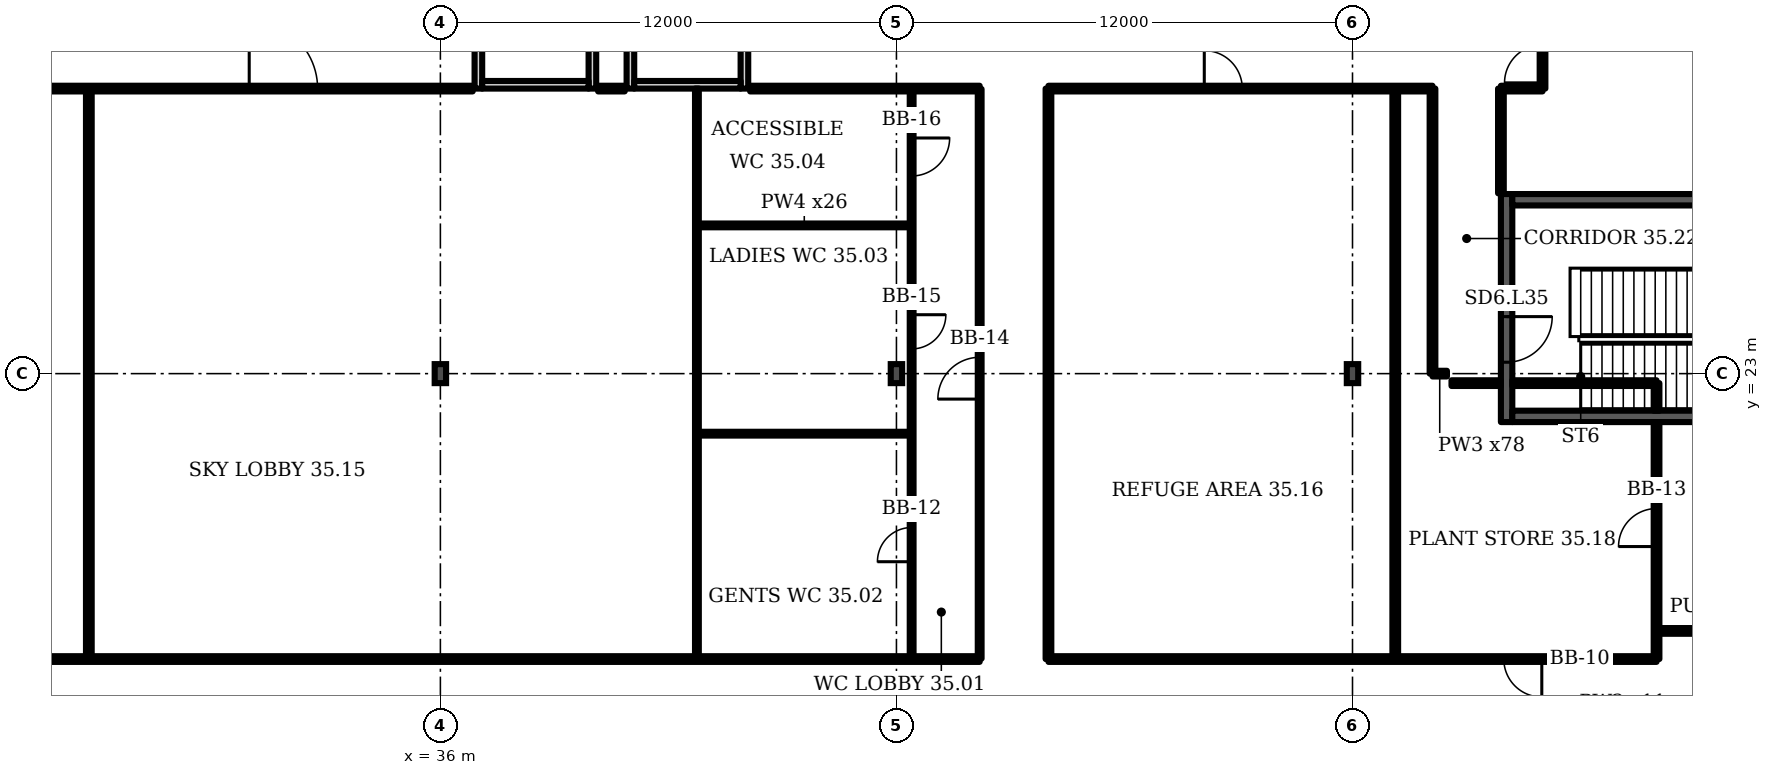
"""IFC4 building model, lengths in metres.
Left out: names, types, materials, properties, quantities, classifications, styles, units other than length and angle.
Written with IfcOpenShell. Run it as: python <this file> out.ifc"""

import sys

from ifc_helpers import new_model, si_unit, direction, frame, frame_2d, origin, origin_2d, place, context, subcontext, project, spatial, rectangle, i_section, extrude, element, fill, save


model = new_model("IFC4")
c1 = context("Model", 3, precision=1e-05, world=origin(), true_north=direction((0.0, 1.0)))
c2 = subcontext(c1, "Body", "Model", "MODEL_VIEW")
j1 = project(units=[si_unit("LENGTHUNIT", "METRE"), si_unit("PLANEANGLEUNIT", "RADIAN")], contexts=[c1])
p1 = place(None, origin())
s1 = spatial("IfcSite", under=j1, at=p1, CompositionType="ELEMENT")
p2 = place(p1, origin())
s2 = spatial("IfcBuilding", under=s1, at=p2, CompositionType="ELEMENT")
p3 = place(p2, frame((0.0, 0.0, 147.1)))
s3 = spatial("IfcBuildingStorey", under=s2, at=p3, CompositionType="ELEMENT", Elevation=147.1)
for number, where, z_axis, x_axis in (
    (1, (36.0, 23.0, 0.0), (0.0, 0.0, 1.0), (1.0, 0.0, 0.0)),
    (2, (48.0, 23.0, 0.0), (0.0, 0.0, 1.0), (1.0, 0.0, 0.0)),
    (3, (60.0, 23.0, 0.0), (0.0, 0.0, 1.0), (1.0, 0.0, 0.0)),
):
    element("IfcColumn", number, at=place(p3, frame(where, z_axis=z_axis, x_axis=x_axis)), inside=s3, PredefinedType="COLUMN", context=c2, shape_type="SweptSolid", body=[
        extrude(i_section(OverallWidth=0.3, OverallDepth=0.5, WebThickness=0.014, FlangeThickness=0.028, FilletRadius=0.027, at=origin_2d()), origin(), (0.0, 0.0, 1.0), 4.8),
    ])
p4 = place(p3, frame((37.0, 30.5, 0.0), z_axis=(0.0, 0.0, 1.0), x_axis=(0.0, 1.0, 0.0)))
e4 = element("IfcWall", 4, at=p4, inside=s3, PredefinedType="PARTITIONING", context=c2, shape_type="SweptSolid", body=[
    extrude(rectangle(XDim=3.5, YDim=0.2, at=frame_2d((1.75, 0.0))), origin(), (0.0, 0.0, 1.0), 4.4),
])
p5 = place(p4, frame((1.2, 0.0, 0.0)))
e5 = element("IfcOpeningElement", 5, at=p5, cuts=e4, PredefinedType="OPENING", context=c2, shape_type="SweptSolid", body=[
    extrude(rectangle(XDim=1.1, YDim=2.1, at=frame_2d((0.55, 1.05))), frame((0.0, 0.11, 0.0), z_axis=(0.0, -1.0, 0.0), x_axis=(1.0, 0.0, 0.0)), (0.0, 0.0, 1.0), 0.22),
])
p6 = place(p3, frame((40.0, 30.5, 0.0), z_axis=(0.0, 0.0, 1.0), x_axis=(0.0, 1.0, 0.0)))
e6 = element("IfcWall", 6, at=p6, inside=s3, PredefinedType="PARTITIONING", context=c2, shape_type="SweptSolid", body=[
    extrude(rectangle(XDim=3.5, YDim=0.2, at=frame_2d((1.75, 0.0))), origin(), (0.0, 0.0, 1.0), 4.4),
])
p7 = place(p3, frame((37.1, 30.6, 0.0), z_axis=(0.0, 0.0, 1.0), x_axis=(1.0, 0.0, 0.0)))
e7 = element("IfcWall", 7, at=p7, inside=s3, PredefinedType="PARTITIONING", context=c2, shape_type="SweptSolid", body=[
    extrude(rectangle(XDim=2.8, YDim=0.2, at=frame_2d((1.4, 0.0))), origin(), (0.0, 0.0, 1.0), 4.4),
])
p8 = place(p3, frame((41.0, 30.5, 0.0), z_axis=(0.0, 0.0, 1.0), x_axis=(0.0, 1.0, 0.0)))
e8 = element("IfcWall", 8, at=p8, inside=s3, PredefinedType="PARTITIONING", context=c2, shape_type="SweptSolid", body=[
    extrude(rectangle(XDim=3.5, YDim=0.2, at=frame_2d((1.75, 0.0))), origin(), (0.0, 0.0, 1.0), 4.4),
])
p9 = place(p3, frame((44.0, 30.5, 0.0), z_axis=(0.0, 0.0, 1.0), x_axis=(0.0, 1.0, 0.0)))
e9 = element("IfcWall", 9, at=p9, inside=s3, PredefinedType="PARTITIONING", context=c2, shape_type="SweptSolid", body=[
    extrude(rectangle(XDim=3.5, YDim=0.2, at=frame_2d((1.75, 0.0))), origin(), (0.0, 0.0, 1.0), 4.4),
])
p10 = place(p9, frame((1.2, 0.0, 0.0)))
e10 = element("IfcOpeningElement", 10, at=p10, cuts=e9, PredefinedType="OPENING", context=c2, shape_type="SweptSolid", body=[
    extrude(rectangle(XDim=1.1, YDim=2.1, at=frame_2d((0.55, 1.05))), frame((0.0, 0.11, 0.0), z_axis=(0.0, -1.0, 0.0), x_axis=(1.0, 0.0, 0.0)), (0.0, 0.0, 1.0), 0.22),
])
p11 = place(p3, frame((41.1, 30.6, 0.0), z_axis=(0.0, 0.0, 1.0), x_axis=(1.0, 0.0, 0.0)))
e11 = element("IfcWall", 11, at=p11, inside=s3, PredefinedType="PARTITIONING", context=c2, shape_type="SweptSolid", body=[
    extrude(rectangle(XDim=2.8, YDim=0.2, at=frame_2d((1.4, 0.0))), origin(), (0.0, 0.0, 1.0), 4.4),
])
p12 = place(p3, frame((64.055, 21.725, 0.0), z_axis=(0.0, 0.0, 1.0), x_axis=(0.0, 1.0, 0.0)))
e12 = element("IfcWall", 12, at=p12, inside=s3, PredefinedType="SHEAR", context=c2, shape_type="SweptSolid", body=[
    extrude(rectangle(XDim=6.0, YDim=0.3, at=frame_2d((3.0, 0.0))), origin(), (0.0, 0.0, 1.0), 4.4),
])
p13 = place(p12, frame((1.575, 0.0, 0.0)))
e13 = element("IfcOpeningElement", 13, at=p13, cuts=e12, PredefinedType="OPENING", context=c2, shape_type="SweptSolid", body=[
    extrude(rectangle(XDim=1.2, YDim=2.1, at=frame_2d((0.6, 1.05))), frame((0.0, 0.16, 0.0), z_axis=(0.0, -1.0, 0.0), x_axis=(1.0, 0.0, 0.0)), (0.0, 0.0, 1.0), 0.32),
])
p14 = place(p3, frame((16.0, 30.5, 0.0), z_axis=(0.0, 0.0, 1.0), x_axis=(1.0, 0.0, 0.0)))
e14 = element("IfcWall", 14, at=p14, inside=s3, PredefinedType="PARTITIONING", context=c2, shape_type="SweptSolid", body=[
    extrude(rectangle(XDim=20.85, YDim=0.15, at=frame_2d((10.425, 0.0))), origin(), (0.0, 0.0, 1.0), 4.4),
])
p15 = place(p14, frame((3.12, 0.0, 0.0)))
e15 = element("IfcOpeningElement", 15, at=p15, cuts=e14, PredefinedType="OPENING", context=c2, shape_type="SweptSolid", body=[
    extrude(rectangle(XDim=1.0, YDim=2.1, at=frame_2d((0.5, 1.05))), frame((0.0, 0.085, 0.0), z_axis=(0.0, -1.0, 0.0), x_axis=(1.0, 0.0, 0.0)), (0.0, 0.0, 1.0), 0.17),
])
p16 = place(p14, frame((14.97, 0.0, 0.0)))
e16 = element("IfcOpeningElement", 16, at=p16, cuts=e14, PredefinedType="OPENING", context=c2, shape_type="SweptSolid", body=[
    extrude(rectangle(XDim=1.8, YDim=2.1, at=frame_2d((0.9, 1.05))), frame((0.0, 0.085, 0.0), z_axis=(0.0, -1.0, 0.0), x_axis=(1.0, 0.0, 0.0)), (0.0, 0.0, 1.0), 0.17),
])
p17 = place(p3, frame((17.8, 15.49, 0.0), z_axis=(0.0, 0.0, 1.0), x_axis=(1.0, 0.0, 0.0)))
e17 = element("IfcWall", 17, at=p17, inside=s3, PredefinedType="PARTITIONING", context=c2, shape_type="SweptSolid", body=[
    extrude(rectangle(XDim=32.39, YDim=0.15, at=frame_2d((16.195, 0.0))), origin(), (0.0, 0.0, 1.0), 4.4),
])
p18 = place(p3, frame((26.75, 15.49, 0.0), z_axis=(0.0, 0.0, 1.0), x_axis=(0.0, 1.0, 0.0)))
e18 = element("IfcWall", 18, at=p18, inside=s3, PredefinedType="PARTITIONING", context=c2, shape_type="SweptSolid", body=[
    extrude(rectangle(XDim=15.01, YDim=0.15, at=frame_2d((7.505, 0.0))), origin(), (0.0, 0.0, 1.0), 4.4),
])
p19 = place(p3, frame((42.75, 15.49, 0.0), z_axis=(0.0, 0.0, 1.0), x_axis=(0.0, 1.0, 0.0)))
e19 = element("IfcWall", 19, at=p19, inside=s3, PredefinedType="PARTITIONING", context=c2, shape_type="SweptSolid", body=[
    extrude(rectangle(XDim=15.01, YDim=0.1, at=frame_2d((7.505, 0.0))), origin(), (0.0, 0.0, 1.0), 4.4),
])
for number, where, z_axis, x_axis in (
    (20, (42.75, 21.42, 0.0), (0.0, 0.0, 1.0), (1.0, 0.0, 0.0)),
    (21, (42.75, 26.9, 0.0), (0.0, 0.0, 1.0), (1.0, 0.0, 0.0)),
):
    element("IfcWall", number, at=place(p3, frame(where, z_axis=z_axis, x_axis=x_axis)), inside=s3, PredefinedType="PARTITIONING", context=c2, shape_type="SweptSolid", body=[
        extrude(rectangle(XDim=5.65, YDim=0.1, at=frame_2d((2.825, 0.0))), origin(), (0.0, 0.0, 1.0), 4.4),
    ])
p20 = place(p3, frame((48.4, 15.5, 0.0), z_axis=(0.0, 0.0, 1.0), x_axis=(0.0, 1.0, 0.0)))
e22 = element("IfcWall", 22, at=p20, inside=s3, PredefinedType="PARTITIONING", context=c2, shape_type="SweptSolid", body=[
    extrude(rectangle(XDim=14.99, YDim=0.1, at=frame_2d((7.495, 0.0))), origin(), (0.0, 0.0, 1.0), 4.4),
])
p21 = place(p20, frame((2.551, 0.0, 0.0)))
e23 = element("IfcOpeningElement", 23, at=p21, cuts=e22, PredefinedType="OPENING", context=c2, shape_type="SweptSolid", body=[
    extrude(rectangle(XDim=0.9, YDim=2.1, at=frame_2d((0.45, 1.05))), frame((0.0, 0.06, 0.0), z_axis=(0.0, -1.0, 0.0), x_axis=(1.0, 0.0, 0.0)), (0.0, 0.0, 1.0), 0.12),
])
p22 = place(p20, frame((8.15, 0.0, 0.0)))
e24 = element("IfcOpeningElement", 24, at=p22, cuts=e22, PredefinedType="OPENING", context=c2, shape_type="SweptSolid", body=[
    extrude(rectangle(XDim=0.9, YDim=2.1, at=frame_2d((0.45, 1.05))), frame((0.0, 0.06, 0.0), z_axis=(0.0, -1.0, 0.0), x_axis=(1.0, 0.0, 0.0)), (0.0, 0.0, 1.0), 0.12),
])
p23 = place(p20, frame((12.7, 0.0, 0.0)))
e25 = element("IfcOpeningElement", 25, at=p23, cuts=e22, PredefinedType="OPENING", context=c2, shape_type="SweptSolid", body=[
    extrude(rectangle(XDim=1.0, YDim=2.1, at=frame_2d((0.5, 1.05))), frame((0.0, 0.06, 0.0), z_axis=(0.0, -1.0, 0.0), x_axis=(1.0, 0.0, 0.0)), (0.0, 0.0, 1.0), 0.12),
])
p24 = place(p3, frame((50.19, 15.5, 0.0), z_axis=(0.0, 0.0, 1.0), x_axis=(0.0, 1.0, 0.0)))
e26 = element("IfcWall", 26, at=p24, inside=s3, PredefinedType="PARTITIONING", context=c2, shape_type="SweptSolid", body=[
    extrude(rectangle(XDim=14.99, YDim=0.1, at=frame_2d((7.495, 0.0))), origin(), (0.0, 0.0, 1.0), 4.4),
])
p25 = place(p24, frame((6.83, 0.0, 0.0)))
e27 = element("IfcOpeningElement", 27, at=p25, cuts=e26, PredefinedType="OPENING", context=c2, shape_type="SweptSolid", body=[
    extrude(rectangle(XDim=1.1, YDim=2.1, at=frame_2d((0.55, 1.05))), frame((0.0, 0.06, 0.0), z_axis=(0.0, -1.0, 0.0), x_axis=(1.0, 0.0, 0.0)), (0.0, 0.0, 1.0), 0.12),
])
p26 = place(p3, frame((52.0, 15.49, 0.0), z_axis=(0.0, 0.0, 1.0), x_axis=(0.0, 1.0, 0.0)))
e28 = element("IfcWall", 28, at=p26, inside=s3, PredefinedType="PARTITIONING", context=c2, shape_type="SweptSolid", body=[
    extrude(rectangle(XDim=15.01, YDim=0.15, at=frame_2d((7.505, 0.0))), origin(), (0.0, 0.0, 1.0), 4.4),
])
p27 = place(p3, frame((52.0, 15.49, 0.0), z_axis=(0.0, 0.0, 1.0), x_axis=(1.0, 0.0, 0.0)))
e29 = element("IfcWall", 29, at=p27, inside=s3, PredefinedType="PARTITIONING", context=c2, shape_type="SweptSolid", body=[
    extrude(rectangle(XDim=16.0, YDim=0.15, at=frame_2d((8.0, 0.0))), origin(), (0.0, 0.0, 1.0), 4.4),
])
p28 = place(p27, frame((11.981, 0.0, 0.0)))
e30 = element("IfcOpeningElement", 30, at=p28, cuts=e29, PredefinedType="OPENING", context=c2, shape_type="SweptSolid", body=[
    extrude(rectangle(XDim=1.0, YDim=2.1, at=frame_2d((0.5, 1.05))), frame((0.0, 0.085, 0.0), z_axis=(0.0, -1.0, 0.0), x_axis=(1.0, 0.0, 0.0)), (0.0, 0.0, 1.0), 0.17),
])
p29 = place(p3, frame((52.0, 30.5, 0.0), z_axis=(0.0, 0.0, 1.0), x_axis=(1.0, 0.0, 0.0)))
e31 = element("IfcWall", 31, at=p29, inside=s3, PredefinedType="PARTITIONING", context=c2, shape_type="SweptSolid", body=[
    extrude(rectangle(XDim=10.105, YDim=0.15, at=frame_2d((5.052, 0.0))), origin(), (0.0, 0.0, 1.0), 4.4),
])
p30 = place(p29, frame((4.1, 0.0, 0.0)))
e32 = element("IfcOpeningElement", 32, at=p30, cuts=e31, PredefinedType="OPENING", context=c2, shape_type="SweptSolid", body=[
    extrude(rectangle(XDim=1.0, YDim=2.1, at=frame_2d((0.5, 1.05))), frame((0.0, 0.085, 0.0), z_axis=(0.0, -1.0, 0.0), x_axis=(1.0, 0.0, 0.0)), (0.0, 0.0, 1.0), 0.17),
])
p31 = place(p3, frame((61.125, 15.49, 0.0), z_axis=(0.0, 0.0, 1.0), x_axis=(0.0, 1.0, 0.0)))
e33 = element("IfcWall", 33, at=p31, inside=s3, PredefinedType="PARTITIONING", context=c2, shape_type="SweptSolid", body=[
    extrude(rectangle(XDim=15.01, YDim=0.15, at=frame_2d((7.505, 0.0))), origin(), (0.0, 0.0, 1.0), 4.4),
])
p32 = place(p3, frame((62.105, 23.0, 0.0), z_axis=(0.0, 0.0, 1.0), x_axis=(0.0, 1.0, 0.0)))
e34 = element("IfcWall", 34, at=p32, inside=s3, PredefinedType="PARTITIONING", context=c2, shape_type="SweptSolid", body=[
    extrude(rectangle(XDim=7.5, YDim=0.15, at=frame_2d((3.75, 0.0))), origin(), (0.0, 0.0, 1.0), 4.4),
])
p33 = place(p3, frame((62.105, 23.0, 0.0), z_axis=(0.0, 0.0, 1.0), x_axis=(1.0, 0.0, 0.0)))
e35 = element("IfcWall", 35, at=p33, inside=s3, PredefinedType="PARTITIONING", context=c2, shape_type="SweptSolid", body=[
    extrude(rectangle(XDim=0.38, YDim=0.15, at=frame_2d((0.19, 0.0))), origin(), (0.0, 0.0, 1.0), 4.4),
])
p34 = place(p3, frame((62.605, 22.75, 0.0), z_axis=(0.0, 0.0, 1.0), x_axis=(1.0, 0.0, 0.0)))
e36 = element("IfcWall", 36, at=p34, inside=s3, PredefinedType="PARTITIONING", context=c2, shape_type="SweptSolid", body=[
    extrude(rectangle(XDim=1.3, YDim=0.15, at=frame_2d((0.65, 0.0))), origin(), (0.0, 0.0, 1.0), 4.4),
])
p35 = place(p3, frame((63.905, 27.745, 0.0), z_axis=(0.0, 0.0, 1.0), x_axis=(0.0, 1.0, 0.0)))
e37 = element("IfcWall", 37, at=p35, inside=s3, PredefinedType="PARTITIONING", context=c2, shape_type="SweptSolid", body=[
    extrude(rectangle(XDim=2.755, YDim=0.15, at=frame_2d((1.377, 0.0))), origin(), (0.0, 0.0, 1.0), 4.4),
])
p36 = place(p3, frame((63.905, 30.5, 0.0), z_axis=(0.0, 0.0, 1.0), x_axis=(1.0, 0.0, 0.0)))
e38 = element("IfcWall", 38, at=p36, inside=s3, PredefinedType="PARTITIONING", context=c2, shape_type="SweptSolid", body=[
    extrude(rectangle(XDim=1.095, YDim=0.15, at=frame_2d((0.547, 0.0))), origin(), (0.0, 0.0, 1.0), 4.4),
])
p37 = place(p3, frame((65.0, 30.5, 0.0), z_axis=(0.0, 0.0, 1.0), x_axis=(0.0, 1.0, 0.0)))
e39 = element("IfcWall", 39, at=p37, inside=s3, PredefinedType="PARTITIONING", context=c2, shape_type="SweptSolid", body=[
    extrude(rectangle(XDim=3.48, YDim=0.15, at=frame_2d((1.74, 0.0))), origin(), (0.0, 0.0, 1.0), 4.4),
])
p38 = place(p37, frame((0.15, 0.0, 0.0)))
e40 = element("IfcOpeningElement", 40, at=p38, cuts=e39, PredefinedType="OPENING", context=c2, shape_type="SweptSolid", body=[
    extrude(rectangle(XDim=1.0, YDim=2.1, at=frame_2d((0.5, 1.05))), frame((0.0, 0.085, 0.0), z_axis=(0.0, -1.0, 0.0), x_axis=(1.0, 0.0, 0.0)), (0.0, 0.0, 1.0), 0.17),
])
p39 = place(p3, frame((68.0, 15.49, 0.0), z_axis=(0.0, 0.0, 1.0), x_axis=(0.0, 1.0, 0.0)))
e41 = element("IfcWall", 41, at=p39, inside=s3, PredefinedType="PARTITIONING", context=c2, shape_type="SweptSolid", body=[
    extrude(rectangle(XDim=6.235, YDim=0.15, at=frame_2d((3.118, 0.0))), origin(), (0.0, 0.0, 1.0), 4.4),
])
p40 = place(p39, frame((2.96, 0.0, 0.0)))
e42 = element("IfcOpeningElement", 42, at=p40, cuts=e41, PredefinedType="OPENING", context=c2, shape_type="SweptSolid", body=[
    extrude(rectangle(XDim=1.0, YDim=2.1, at=frame_2d((0.5, 1.05))), frame((0.0, 0.085, 0.0), z_axis=(0.0, -1.0, 0.0), x_axis=(1.0, 0.0, 0.0)), (0.0, 0.0, 1.0), 0.17),
])
p41 = place(p3, frame((68.0, 16.23, 0.0), z_axis=(0.0, 0.0, 1.0), x_axis=(1.0, 0.0, 0.0)))
e43 = element("IfcWall", 43, at=p41, inside=s3, PredefinedType="PARTITIONING", context=c2, shape_type="SweptSolid", body=[
    extrude(rectangle(XDim=10.86, YDim=0.15, at=frame_2d((5.43, 0.0))), origin(), (0.0, 0.0, 1.0), 4.4),
])
p42 = place(p3, frame((40.15, 30.5, 0.0), z_axis=(0.0, 0.0, 1.0), x_axis=(1.0, 0.0, 0.0)))
e44 = element("IfcWall", 44, at=p42, inside=s3, PredefinedType="PARTITIONING", context=c2, shape_type="SweptSolid", body=[
    extrude(rectangle(XDim=0.7, YDim=0.15, at=frame_2d((0.35, 0.0))), origin(), (0.0, 0.0, 1.0), 4.4),
])
p43 = place(p3, frame((44.15, 30.5, 0.0), z_axis=(0.0, 0.0, 1.0), x_axis=(1.0, 0.0, 0.0)))
e45 = element("IfcWall", 45, at=p43, inside=s3, PredefinedType="PARTITIONING", context=c2, shape_type="SweptSolid", body=[
    extrude(rectangle(XDim=6.04, YDim=0.15, at=frame_2d((3.02, 0.0))), origin(), (0.0, 0.0, 1.0), 4.4),
])
p44 = place(p3, frame((64.205, 22.75, 0.0), z_axis=(0.0, 0.0, 1.0), x_axis=(1.0, 0.0, 0.0)))
e46 = element("IfcWall", 46, at=p44, inside=s3, PredefinedType="PARTITIONING", context=c2, shape_type="SweptSolid", body=[
    extrude(rectangle(XDim=3.795, YDim=0.15, at=frame_2d((1.898, 0.0))), origin(), (0.0, 0.0, 1.0), 4.4),
])
p45 = place(p3, frame((68.0, 22.025, 0.0), z_axis=(0.0, 0.0, 1.0), x_axis=(0.0, 1.0, 0.0)))
e47 = element("IfcWall", 47, at=p45, inside=s3, PredefinedType="PARTITIONING", context=c2, shape_type="SweptSolid", body=[
    extrude(rectangle(XDim=0.725, YDim=0.15, at=frame_2d((0.363, 0.0))), origin(), (0.0, 0.0, 1.0), 4.4),
])
for number, where, z_axis, x_axis in (
    (48, (64.205, 21.875, 0.0), (0.0, 0.0, 1.0), (1.0, 0.0, 0.0)),
    (49, (64.205, 27.575, 0.0), (0.0, 0.0, 1.0), (1.0, 0.0, 0.0)),
):
    element("IfcWall", number, at=place(p3, frame(where, z_axis=z_axis, x_axis=x_axis)), inside=s3, PredefinedType="SHEAR", context=c2, shape_type="SweptSolid", body=[
        extrude(rectangle(XDim=13.286, YDim=0.3, at=frame_2d((6.643, 0.0))), origin(), (0.0, 0.0, 1.0), 4.4),
    ])
p46 = place(p13, origin())
e50 = element("IfcDoor", 50, at=p46, inside=s3, OperationType="SINGLE_SWING_RIGHT", PredefinedType="DOOR", context=c2, shape_type="SweptSolid", body=[
    extrude(rectangle(XDim=1.2, YDim=2.1, at=frame_2d((0.6, 1.05))), frame((0.0, 0.025, 0.0), z_axis=(0.0, -1.0, 0.0), x_axis=(1.0, 0.0, 0.0)), (0.0, 0.0, 1.0), 0.05),
])
fill(e13, e50)
p47 = place(p28, origin())
e51 = element("IfcDoor", 51, at=p47, inside=s3, OperationType="SINGLE_SWING_RIGHT", PredefinedType="DOOR", context=c2, shape_type="SweptSolid", body=[
    extrude(rectangle(XDim=1.0, YDim=2.1, at=frame_2d((0.5, 1.05))), frame((0.0, 0.025, 0.0), z_axis=(0.0, -1.0, 0.0), x_axis=(1.0, 0.0, 0.0)), (0.0, 0.0, 1.0), 0.05),
])
fill(e30, e51)
p48 = place(p21, origin())
e52 = element("IfcDoor", 52, at=p48, inside=s3, OperationType="SINGLE_SWING_LEFT", PredefinedType="DOOR", context=c2, shape_type="SweptSolid", body=[
    extrude(rectangle(XDim=0.9, YDim=2.1, at=frame_2d((0.45, 1.05))), frame((0.0, 0.025, 0.0), z_axis=(0.0, -1.0, 0.0), x_axis=(1.0, 0.0, 0.0)), (0.0, 0.0, 1.0), 0.05),
])
fill(e23, e52)
p49 = place(p40, origin())
e53 = element("IfcDoor", 53, at=p49, inside=s3, OperationType="SINGLE_SWING_LEFT", PredefinedType="DOOR", context=c2, shape_type="SweptSolid", body=[
    extrude(rectangle(XDim=1.0, YDim=2.1, at=frame_2d((0.5, 1.05))), frame((0.0, 0.025, 0.0), z_axis=(0.0, -1.0, 0.0), x_axis=(1.0, 0.0, 0.0)), (0.0, 0.0, 1.0), 0.05),
])
fill(e42, e53)
p50 = place(p25, origin())
e54 = element("IfcDoor", 54, at=p50, inside=s3, OperationType="SINGLE_SWING_LEFT", PredefinedType="DOOR", context=c2, shape_type="SweptSolid", body=[
    extrude(rectangle(XDim=1.1, YDim=2.1, at=frame_2d((0.55, 1.05))), frame((0.0, 0.025, 0.0), z_axis=(0.0, -1.0, 0.0), x_axis=(1.0, 0.0, 0.0)), (0.0, 0.0, 1.0), 0.05),
])
fill(e27, e54)
p51 = place(p22, origin())
e55 = element("IfcDoor", 55, at=p51, inside=s3, OperationType="SINGLE_SWING_RIGHT", PredefinedType="DOOR", context=c2, shape_type="SweptSolid", body=[
    extrude(rectangle(XDim=0.9, YDim=2.1, at=frame_2d((0.45, 1.05))), frame((0.0, 0.025, 0.0), z_axis=(0.0, -1.0, 0.0), x_axis=(1.0, 0.0, 0.0)), (0.0, 0.0, 1.0), 0.05),
])
fill(e24, e55)
p52 = place(p23, origin())
e56 = element("IfcDoor", 56, at=p52, inside=s3, OperationType="SINGLE_SWING_RIGHT", PredefinedType="DOOR", context=c2, shape_type="SweptSolid", body=[
    extrude(rectangle(XDim=1.0, YDim=2.1, at=frame_2d((0.5, 1.05))), frame((0.0, 0.025, 0.0), z_axis=(0.0, -1.0, 0.0), x_axis=(1.0, 0.0, 0.0)), (0.0, 0.0, 1.0), 0.05),
])
fill(e25, e56)
p53 = place(p16, origin())
e57 = element("IfcDoor", 57, at=p53, inside=s3, OperationType="DOUBLE_DOOR_SINGLE_SWING", PredefinedType="DOOR", context=c2, shape_type="SweptSolid", body=[
    extrude(rectangle(XDim=1.8, YDim=2.1, at=frame_2d((0.9, 1.05))), frame((0.0, 0.025, 0.0), z_axis=(0.0, -1.0, 0.0), x_axis=(1.0, 0.0, 0.0)), (0.0, 0.0, 1.0), 0.05),
])
fill(e16, e57)
p54 = place(p30, origin())
e58 = element("IfcDoor", 58, at=p54, inside=s3, OperationType="SINGLE_SWING_LEFT", PredefinedType="DOOR", context=c2, shape_type="SweptSolid", body=[
    extrude(rectangle(XDim=1.0, YDim=2.1, at=frame_2d((0.5, 1.05))), frame((0.0, 0.025, 0.0), z_axis=(0.0, -1.0, 0.0), x_axis=(1.0, 0.0, 0.0)), (0.0, 0.0, 1.0), 0.05),
])
fill(e32, e58)
p55 = place(p38, origin())
e59 = element("IfcDoor", 59, at=p55, inside=s3, OperationType="SINGLE_SWING_LEFT", PredefinedType="DOOR", context=c2, shape_type="SweptSolid", body=[
    extrude(rectangle(XDim=1.0, YDim=2.1, at=frame_2d((0.5, 1.05))), frame((0.0, 0.025, 0.0), z_axis=(0.0, -1.0, 0.0), x_axis=(1.0, 0.0, 0.0)), (0.0, 0.0, 1.0), 0.05),
])
fill(e40, e59)
save(model, sys.argv[1])
